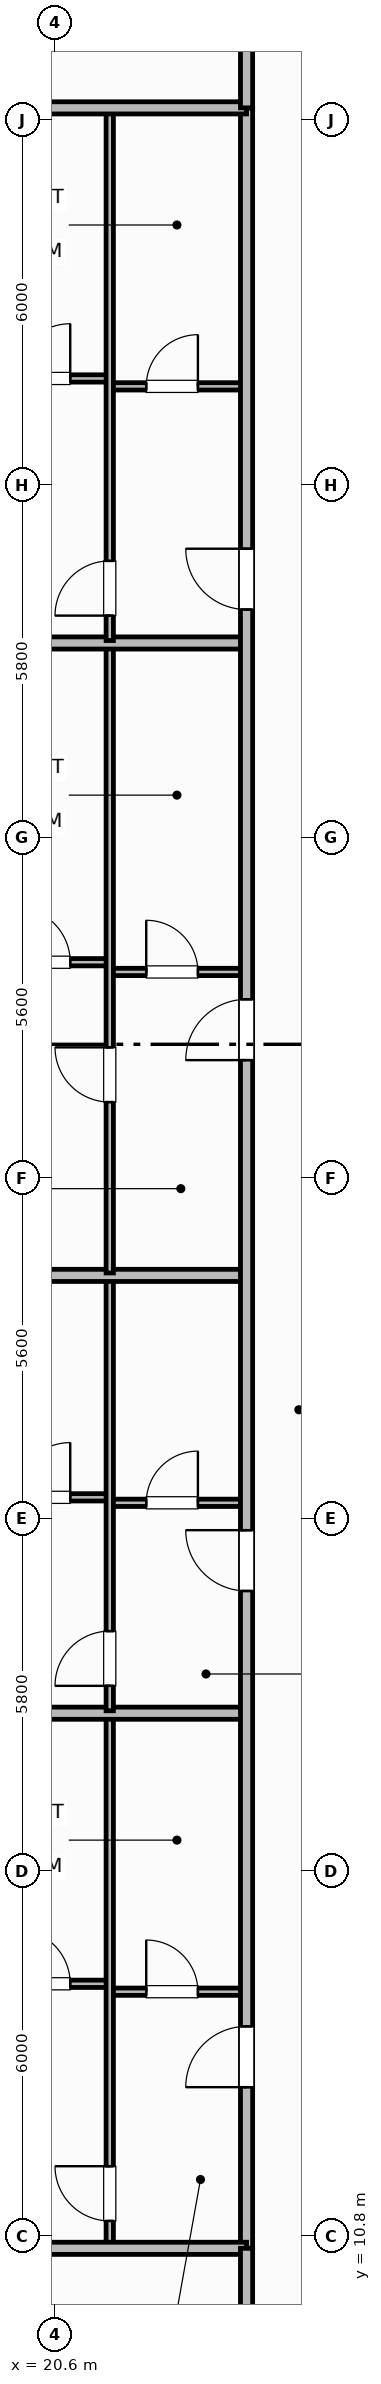
"""IFC4 building model, lengths in metres.
Left out: names, types, materials, properties, quantities, classifications, styles, units other than length and angle.
Written with IfcOpenShell. Run it as: python <this file> out.ifc"""

import sys

from ifc_helpers import new_model, si_unit, direction, frame, frame_2d, origin, place, context, subcontext, project, spatial, rectangle, extrude, element, fill, save


model = new_model("IFC4")
c1 = context("Model", 3, precision=1e-05, world=origin(), true_north=direction((0.0, 1.0)))
c2 = subcontext(c1, "Body", "Model", "MODEL_VIEW")
j1 = project(units=[si_unit("LENGTHUNIT", "METRE"), si_unit("PLANEANGLEUNIT", "RADIAN")], contexts=[c1])
p1 = place(None, origin())
s1 = spatial("IfcSite", under=j1, at=p1, CompositionType="ELEMENT")
p2 = place(p1, origin())
s2 = spatial("IfcBuilding", under=s1, at=p2, CompositionType="ELEMENT")
p3 = place(p2, frame((0.0, 0.0, 54.7)))
s3 = spatial("IfcBuildingStorey", under=s2, at=p3, CompositionType="ELEMENT", Elevation=54.7)
p4 = place(p3, frame((21.5, 14.82, 0.0), z_axis=(0.0, 0.0, 1.0), x_axis=(1.0, 0.0, 0.0)))
e1 = element("IfcWall", 1, at=p4, inside=s3, PredefinedType="PARTITIONING", context=c2, shape_type="SweptSolid", body=[
    extrude(rectangle(XDim=2.25, YDim=0.12, at=frame_2d((1.125, 0.0))), origin(), (0.0, 0.0, 1.0), 2.53),
])
p5 = place(p4, frame((0.6, 0.0, 0.0)))
e2 = element("IfcOpeningElement", 2, at=p5, cuts=e1, PredefinedType="OPENING", context=c2, shape_type="SweptSolid", body=[
    extrude(rectangle(XDim=0.85, YDim=2.1, at=frame_2d((0.425, 1.05))), frame((0.0, 0.07, 0.0), z_axis=(0.0, -1.0, 0.0), x_axis=(1.0, 0.0, 0.0)), (0.0, 0.0, 1.0), 0.14),
])
p6 = place(p3, frame((14.57, 14.95, 0.0), z_axis=(0.0, 0.0, 1.0), x_axis=(1.0, 0.0, 0.0)))
e3 = element("IfcWall", 3, at=p6, inside=s3, PredefinedType="PARTITIONING", context=c2, shape_type="SweptSolid", body=[
    extrude(rectangle(XDim=6.93, YDim=0.12, at=frame_2d((3.465, 0.0))), origin(), (0.0, 0.0, 1.0), 2.53),
])
p7 = place(p6, frame((5.38, 0.0, 0.0)))
e4 = element("IfcOpeningElement", 4, at=p7, cuts=e3, PredefinedType="OPENING", context=c2, shape_type="SweptSolid", body=[
    extrude(rectangle(XDim=0.9, YDim=2.1, at=frame_2d((0.45, 1.05))), frame((0.0, 0.07, 0.0), z_axis=(0.0, -1.0, 0.0), x_axis=(1.0, 0.0, 0.0)), (0.0, 0.0, 1.0), 0.14),
])
p8 = place(p3, frame((21.5, 10.64, 0.0), z_axis=(0.0, 0.0, 1.0), x_axis=(0.0, 1.0, 0.0)))
e5 = element("IfcWall", 5, at=p8, inside=s3, PredefinedType="PARTITIONING", context=c2, shape_type="SweptSolid", body=[
    extrude(rectangle(XDim=8.72, YDim=0.12, at=frame_2d((4.36, 0.0))), origin(), (0.0, 0.0, 1.0), 2.53),
])
p9 = place(p8, frame((0.41, 0.0, 0.0)))
e6 = element("IfcOpeningElement", 6, at=p9, cuts=e5, PredefinedType="OPENING", context=c2, shape_type="SweptSolid", body=[
    extrude(rectangle(XDim=0.9, YDim=2.1, at=frame_2d((0.45, 1.05))), frame((0.0, 0.07, 0.0), z_axis=(0.0, -1.0, 0.0), x_axis=(1.0, 0.0, 0.0)), (0.0, 0.0, 1.0), 0.14),
])
p10 = place(p3, frame((14.57, 19.4, 0.0), z_axis=(0.0, 0.0, 1.0), x_axis=(1.0, 0.0, 0.0)))
e7 = element("IfcWall", 7, at=p10, inside=s3, PredefinedType="PARTITIONING", context=c2, shape_type="SweptSolid", body=[
    extrude(rectangle(XDim=9.18, YDim=0.2, at=frame_2d((4.59, 0.0))), origin(), (0.0, 0.0, 1.0), 2.53),
])
p11 = place(p3, frame((21.5, 22.86, 0.0), z_axis=(0.0, 0.0, 1.0), x_axis=(1.0, 0.0, 0.0)))
e8 = element("IfcWall", 8, at=p11, inside=s3, PredefinedType="PARTITIONING", context=c2, shape_type="SweptSolid", body=[
    extrude(rectangle(XDim=2.25, YDim=0.12, at=frame_2d((1.125, 0.0))), origin(), (0.0, 0.0, 1.0), 2.53),
])
p12 = place(p11, frame((0.6, 0.0, 0.0)))
e9 = element("IfcOpeningElement", 9, at=p12, cuts=e8, PredefinedType="OPENING", context=c2, shape_type="SweptSolid", body=[
    extrude(rectangle(XDim=0.85, YDim=2.1, at=frame_2d((0.425, 1.05))), frame((0.0, 0.07, 0.0), z_axis=(0.0, -1.0, 0.0), x_axis=(1.0, 0.0, 0.0)), (0.0, 0.0, 1.0), 0.14),
])
p13 = place(p3, frame((14.57, 22.95, 0.0), z_axis=(0.0, 0.0, 1.0), x_axis=(1.0, 0.0, 0.0)))
e10 = element("IfcWall", 10, at=p13, inside=s3, PredefinedType="PARTITIONING", context=c2, shape_type="SweptSolid", body=[
    extrude(rectangle(XDim=6.93, YDim=0.12, at=frame_2d((3.465, 0.0))), origin(), (0.0, 0.0, 1.0), 2.53),
])
p14 = place(p13, frame((5.38, 0.0, 0.0)))
e11 = element("IfcOpeningElement", 11, at=p14, cuts=e10, PredefinedType="OPENING", context=c2, shape_type="SweptSolid", body=[
    extrude(rectangle(XDim=0.9, YDim=2.1, at=frame_2d((0.45, 1.05))), frame((0.0, 0.07, 0.0), z_axis=(0.0, -1.0, 0.0), x_axis=(1.0, 0.0, 0.0)), (0.0, 0.0, 1.0), 0.14),
])
p15 = place(p3, frame((21.5, 19.44, 0.0), z_axis=(0.0, 0.0, 1.0), x_axis=(0.0, 1.0, 0.0)))
e12 = element("IfcWall", 12, at=p15, inside=s3, PredefinedType="PARTITIONING", context=c2, shape_type="SweptSolid", body=[
    extrude(rectangle(XDim=7.12, YDim=0.12, at=frame_2d((3.56, 0.0))), origin(), (0.0, 0.0, 1.0), 2.53),
])
p16 = place(p15, frame((0.41, 0.0, 0.0)))
e13 = element("IfcOpeningElement", 13, at=p16, cuts=e12, PredefinedType="OPENING", context=c2, shape_type="SweptSolid", body=[
    extrude(rectangle(XDim=0.9, YDim=2.1, at=frame_2d((0.45, 1.05))), frame((0.0, 0.07, 0.0), z_axis=(0.0, -1.0, 0.0), x_axis=(1.0, 0.0, 0.0)), (0.0, 0.0, 1.0), 0.14),
])
p17 = place(p3, frame((15.284, 26.6, 0.0), z_axis=(0.0, 0.0, 1.0), x_axis=(1.0, 0.0, 0.0)))
e14 = element("IfcWall", 14, at=p17, inside=s3, PredefinedType="PARTITIONING", context=c2, shape_type="SweptSolid", body=[
    extrude(rectangle(XDim=8.466, YDim=0.2, at=frame_2d((4.233, 0.0))), origin(), (0.0, 0.0, 1.0), 2.53),
])
p18 = place(p3, frame((21.5, 31.59, 0.0), z_axis=(0.0, 0.0, 1.0), x_axis=(1.0, 0.0, 0.0)))
e15 = element("IfcWall", 15, at=p18, inside=s3, PredefinedType="PARTITIONING", context=c2, shape_type="SweptSolid", body=[
    extrude(rectangle(XDim=2.25, YDim=0.12, at=frame_2d((1.125, 0.0))), origin(), (0.0, 0.0, 1.0), 2.53),
])
p19 = place(p18, frame((0.6, 0.0, 0.0)))
e16 = element("IfcOpeningElement", 16, at=p19, cuts=e15, PredefinedType="OPENING", context=c2, shape_type="SweptSolid", body=[
    extrude(rectangle(XDim=0.85, YDim=2.1, at=frame_2d((0.425, 1.05))), frame((0.0, 0.07, 0.0), z_axis=(0.0, -1.0, 0.0), x_axis=(1.0, 0.0, 0.0)), (0.0, 0.0, 1.0), 0.14),
])
p20 = place(p3, frame((15.053, 31.75, 0.0), z_axis=(0.0, 0.0, 1.0), x_axis=(1.0, 0.0, 0.0)))
e17 = element("IfcWall", 17, at=p20, inside=s3, PredefinedType="PARTITIONING", context=c2, shape_type="SweptSolid", body=[
    extrude(rectangle(XDim=6.447, YDim=0.12, at=frame_2d((3.224, 0.0))), origin(), (0.0, 0.0, 1.0), 2.53),
])
p21 = place(p20, frame((4.897, 0.0, 0.0)))
e18 = element("IfcOpeningElement", 18, at=p21, cuts=e17, PredefinedType="OPENING", context=c2, shape_type="SweptSolid", body=[
    extrude(rectangle(XDim=0.9, YDim=2.1, at=frame_2d((0.45, 1.05))), frame((0.0, 0.07, 0.0), z_axis=(0.0, -1.0, 0.0), x_axis=(1.0, 0.0, 0.0)), (0.0, 0.0, 1.0), 0.14),
])
p22 = place(p3, frame((21.5, 26.64, 0.0), z_axis=(0.0, 0.0, 1.0), x_axis=(0.0, 1.0, 0.0)))
e19 = element("IfcWall", 19, at=p22, inside=s3, PredefinedType="PARTITIONING", context=c2, shape_type="SweptSolid", body=[
    extrude(rectangle(XDim=10.32, YDim=0.12, at=frame_2d((5.16, 0.0))), origin(), (0.0, 0.0, 1.0), 2.53),
])
p23 = place(p22, frame((2.81, 0.0, 0.0)))
e20 = element("IfcOpeningElement", 20, at=p23, cuts=e19, PredefinedType="OPENING", context=c2, shape_type="SweptSolid", body=[
    extrude(rectangle(XDim=0.9, YDim=2.1, at=frame_2d((0.45, 1.05))), frame((0.0, 0.07, 0.0), z_axis=(0.0, -1.0, 0.0), x_axis=(1.0, 0.0, 0.0)), (0.0, 0.0, 1.0), 0.14),
])
p24 = place(p3, frame((14.57, 37.0, 0.0), z_axis=(0.0, 0.0, 1.0), x_axis=(1.0, 0.0, 0.0)))
e21 = element("IfcWall", 21, at=p24, inside=s3, PredefinedType="PARTITIONING", context=c2, shape_type="SweptSolid", body=[
    extrude(rectangle(XDim=9.18, YDim=0.2, at=frame_2d((4.59, 0.0))), origin(), (0.0, 0.0, 1.0), 2.53),
])
p25 = place(p3, frame((21.5, 41.22, 0.0), z_axis=(0.0, 0.0, 1.0), x_axis=(1.0, 0.0, 0.0)))
e22 = element("IfcWall", 22, at=p25, inside=s3, PredefinedType="PARTITIONING", context=c2, shape_type="SweptSolid", body=[
    extrude(rectangle(XDim=2.25, YDim=0.12, at=frame_2d((1.125, 0.0))), origin(), (0.0, 0.0, 1.0), 2.53),
])
p26 = place(p25, frame((0.6, 0.0, 0.0)))
e23 = element("IfcOpeningElement", 23, at=p26, cuts=e22, PredefinedType="OPENING", context=c2, shape_type="SweptSolid", body=[
    extrude(rectangle(XDim=0.85, YDim=2.1, at=frame_2d((0.425, 1.05))), frame((0.0, 0.07, 0.0), z_axis=(0.0, -1.0, 0.0), x_axis=(1.0, 0.0, 0.0)), (0.0, 0.0, 1.0), 0.14),
])
p27 = place(p3, frame((14.57, 41.35, 0.0), z_axis=(0.0, 0.0, 1.0), x_axis=(1.0, 0.0, 0.0)))
e24 = element("IfcWall", 24, at=p27, inside=s3, PredefinedType="PARTITIONING", context=c2, shape_type="SweptSolid", body=[
    extrude(rectangle(XDim=6.93, YDim=0.12, at=frame_2d((3.465, 0.0))), origin(), (0.0, 0.0, 1.0), 2.53),
])
p28 = place(p27, frame((5.38, 0.0, 0.0)))
e25 = element("IfcOpeningElement", 25, at=p28, cuts=e24, PredefinedType="OPENING", context=c2, shape_type="SweptSolid", body=[
    extrude(rectangle(XDim=0.9, YDim=2.1, at=frame_2d((0.45, 1.05))), frame((0.0, 0.07, 0.0), z_axis=(0.0, -1.0, 0.0), x_axis=(1.0, 0.0, 0.0)), (0.0, 0.0, 1.0), 0.14),
])
p29 = place(p3, frame((21.5, 37.04, 0.0), z_axis=(0.0, 0.0, 1.0), x_axis=(0.0, 1.0, 0.0)))
e26 = element("IfcWall", 26, at=p29, inside=s3, PredefinedType="PARTITIONING", context=c2, shape_type="SweptSolid", body=[
    extrude(rectangle(XDim=8.72, YDim=0.12, at=frame_2d((4.36, 0.0))), origin(), (0.0, 0.0, 1.0), 2.53),
])
p30 = place(p29, frame((0.41, 0.0, 0.0)))
e27 = element("IfcOpeningElement", 27, at=p30, cuts=e26, PredefinedType="OPENING", context=c2, shape_type="SweptSolid", body=[
    extrude(rectangle(XDim=0.9, YDim=2.1, at=frame_2d((0.45, 1.05))), frame((0.0, 0.07, 0.0), z_axis=(0.0, -1.0, 0.0), x_axis=(1.0, 0.0, 0.0)), (0.0, 0.0, 1.0), 0.14),
])
p31 = place(p3, frame((23.75, 10.6, 0.0), z_axis=(0.0, 0.0, 1.0), x_axis=(0.0, 1.0, 0.0)))
e28 = element("IfcWall", 28, at=p31, inside=s3, PredefinedType="PARTITIONING", context=c2, shape_type="SweptSolid", body=[
    extrude(rectangle(XDim=35.2, YDim=0.2, at=frame_2d((17.6, 0.0))), origin(), (0.0, 0.0, 1.0), 2.53),
])
p32 = place(p31, frame((2.65, 0.0, 0.0)))
e29 = element("IfcOpeningElement", 29, at=p32, cuts=e28, PredefinedType="OPENING", context=c2, shape_type="SweptSolid", body=[
    extrude(rectangle(XDim=1.0, YDim=2.15, at=frame_2d((0.5, 1.075))), frame((0.0, 0.11, 0.0), z_axis=(0.0, -1.0, 0.0), x_axis=(1.0, 0.0, 0.0)), (0.0, 0.0, 1.0), 0.22),
])
p33 = place(p31, frame((10.81, 0.0, 0.0)))
e30 = element("IfcOpeningElement", 30, at=p33, cuts=e28, PredefinedType="OPENING", context=c2, shape_type="SweptSolid", body=[
    extrude(rectangle(XDim=1.0, YDim=2.15, at=frame_2d((0.5, 1.075))), frame((0.0, 0.11, 0.0), z_axis=(0.0, -1.0, 0.0), x_axis=(1.0, 0.0, 0.0)), (0.0, 0.0, 1.0), 0.22),
])
p34 = place(p31, frame((19.54, 0.0, 0.0)))
e31 = element("IfcOpeningElement", 31, at=p34, cuts=e28, PredefinedType="OPENING", context=c2, shape_type="SweptSolid", body=[
    extrude(rectangle(XDim=1.0, YDim=2.15, at=frame_2d((0.5, 1.075))), frame((0.0, 0.11, 0.0), z_axis=(0.0, -1.0, 0.0), x_axis=(1.0, 0.0, 0.0)), (0.0, 0.0, 1.0), 0.22),
])
p35 = place(p31, frame((26.95, 0.0, 0.0)))
e32 = element("IfcOpeningElement", 32, at=p35, cuts=e28, PredefinedType="OPENING", context=c2, shape_type="SweptSolid", body=[
    extrude(rectangle(XDim=1.0, YDim=2.15, at=frame_2d((0.5, 1.075))), frame((0.0, 0.11, 0.0), z_axis=(0.0, -1.0, 0.0), x_axis=(1.0, 0.0, 0.0)), (0.0, 0.0, 1.0), 0.22),
])
for number, where, z_axis, x_axis in (
    (33, (14.99, 10.6, 0.0), (0.0, 0.0, 1.0), (1.0, 0.0, 0.0)),
    (34, (14.99, 45.8, 0.0), (0.0, 0.0, 1.0), (1.0, 0.0, 0.0)),
):
    element("IfcWall", number, at=place(p3, frame(where, z_axis=z_axis, x_axis=x_axis)), inside=s3, PredefinedType="PARTITIONING", context=c2, shape_type="SweptSolid", body=[
        extrude(rectangle(XDim=8.76, YDim=0.2, at=frame_2d((4.38, 0.0))), origin(), (0.0, 0.0, 1.0), 2.53),
    ])
p36 = place(p3, frame((23.75, 4.97, 0.0), z_axis=(0.0, 0.0, 1.0), x_axis=(0.0, 1.0, 0.0)))
e35 = element("IfcWall", 35, at=p36, inside=s3, PredefinedType="PARTITIONING", context=c2, shape_type="SweptSolid", body=[
    extrude(rectangle(XDim=5.63, YDim=0.2, at=frame_2d((2.815, 0.0))), origin(), (0.0, 0.0, 1.0), 2.53),
])
p37 = place(p3, frame((23.75, 45.8, 0.0), z_axis=(0.0, 0.0, 1.0), x_axis=(0.0, 1.0, 0.0)))
e36 = element("IfcWall", 36, at=p37, inside=s3, PredefinedType="PARTITIONING", context=c2, shape_type="SweptSolid", body=[
    extrude(rectangle(XDim=5.63, YDim=0.2, at=frame_2d((2.815, 0.0))), origin(), (0.0, 0.0, 1.0), 2.53),
])
p38 = place(p5, origin())
e37 = element("IfcDoor", 37, at=p38, inside=s3, OperationType="SINGLE_SWING_LEFT", PredefinedType="DOOR", context=c2, shape_type="SweptSolid", body=[
    extrude(rectangle(XDim=0.85, YDim=2.1, at=frame_2d((0.425, 1.05))), frame((0.0, 0.025, 0.0), z_axis=(0.0, -1.0, 0.0), x_axis=(1.0, 0.0, 0.0)), (0.0, 0.0, 1.0), 0.05),
])
fill(e2, e37)
p39 = place(p7, origin())
e38 = element("IfcDoor", 38, at=p39, inside=s3, OperationType="SINGLE_SWING_LEFT", PredefinedType="DOOR", context=c2, shape_type="SweptSolid", body=[
    extrude(rectangle(XDim=0.9, YDim=2.1, at=frame_2d((0.45, 1.05))), frame((0.0, 0.025, 0.0), z_axis=(0.0, -1.0, 0.0), x_axis=(1.0, 0.0, 0.0)), (0.0, 0.0, 1.0), 0.05),
])
fill(e4, e38)
p40 = place(p9, origin())
e39 = element("IfcDoor", 39, at=p40, inside=s3, OperationType="SINGLE_SWING_RIGHT", PredefinedType="DOOR", context=c2, shape_type="SweptSolid", body=[
    extrude(rectangle(XDim=0.9, YDim=2.1, at=frame_2d((0.45, 1.05))), frame((0.0, 0.025, 0.0), z_axis=(0.0, -1.0, 0.0), x_axis=(1.0, 0.0, 0.0)), (0.0, 0.0, 1.0), 0.05),
])
fill(e6, e39)
p41 = place(p12, origin())
e40 = element("IfcDoor", 40, at=p41, inside=s3, OperationType="SINGLE_SWING_RIGHT", PredefinedType="DOOR", context=c2, shape_type="SweptSolid", body=[
    extrude(rectangle(XDim=0.85, YDim=2.1, at=frame_2d((0.425, 1.05))), frame((0.0, 0.025, 0.0), z_axis=(0.0, -1.0, 0.0), x_axis=(1.0, 0.0, 0.0)), (0.0, 0.0, 1.0), 0.05),
])
fill(e9, e40)
p42 = place(p14, origin())
e41 = element("IfcDoor", 41, at=p42, inside=s3, OperationType="SINGLE_SWING_RIGHT", PredefinedType="DOOR", context=c2, shape_type="SweptSolid", body=[
    extrude(rectangle(XDim=0.9, YDim=2.1, at=frame_2d((0.45, 1.05))), frame((0.0, 0.025, 0.0), z_axis=(0.0, -1.0, 0.0), x_axis=(1.0, 0.0, 0.0)), (0.0, 0.0, 1.0), 0.05),
])
fill(e11, e41)
p43 = place(p16, origin())
e42 = element("IfcDoor", 42, at=p43, inside=s3, OperationType="SINGLE_SWING_LEFT", PredefinedType="DOOR", context=c2, shape_type="SweptSolid", body=[
    extrude(rectangle(XDim=0.9, YDim=2.1, at=frame_2d((0.45, 1.05))), frame((0.0, 0.025, 0.0), z_axis=(0.0, -1.0, 0.0), x_axis=(1.0, 0.0, 0.0)), (0.0, 0.0, 1.0), 0.05),
])
fill(e13, e42)
p44 = place(p19, origin())
e43 = element("IfcDoor", 43, at=p44, inside=s3, OperationType="SINGLE_SWING_LEFT", PredefinedType="DOOR", context=c2, shape_type="SweptSolid", body=[
    extrude(rectangle(XDim=0.85, YDim=2.1, at=frame_2d((0.425, 1.05))), frame((0.0, 0.025, 0.0), z_axis=(0.0, -1.0, 0.0), x_axis=(1.0, 0.0, 0.0)), (0.0, 0.0, 1.0), 0.05),
])
fill(e16, e43)
p45 = place(p21, origin())
e44 = element("IfcDoor", 44, at=p45, inside=s3, OperationType="SINGLE_SWING_LEFT", PredefinedType="DOOR", context=c2, shape_type="SweptSolid", body=[
    extrude(rectangle(XDim=0.9, YDim=2.1, at=frame_2d((0.45, 1.05))), frame((0.0, 0.025, 0.0), z_axis=(0.0, -1.0, 0.0), x_axis=(1.0, 0.0, 0.0)), (0.0, 0.0, 1.0), 0.05),
])
fill(e18, e44)
p46 = place(p23, origin())
e45 = element("IfcDoor", 45, at=p46, inside=s3, OperationType="SINGLE_SWING_RIGHT", PredefinedType="DOOR", context=c2, shape_type="SweptSolid", body=[
    extrude(rectangle(XDim=0.9, YDim=2.1, at=frame_2d((0.45, 1.05))), frame((0.0, 0.025, 0.0), z_axis=(0.0, -1.0, 0.0), x_axis=(1.0, 0.0, 0.0)), (0.0, 0.0, 1.0), 0.05),
])
fill(e20, e45)
p47 = place(p26, origin())
e46 = element("IfcDoor", 46, at=p47, inside=s3, OperationType="SINGLE_SWING_RIGHT", PredefinedType="DOOR", context=c2, shape_type="SweptSolid", body=[
    extrude(rectangle(XDim=0.85, YDim=2.1, at=frame_2d((0.425, 1.05))), frame((0.0, 0.025, 0.0), z_axis=(0.0, -1.0, 0.0), x_axis=(1.0, 0.0, 0.0)), (0.0, 0.0, 1.0), 0.05),
])
fill(e23, e46)
p48 = place(p28, origin())
e47 = element("IfcDoor", 47, at=p48, inside=s3, OperationType="SINGLE_SWING_RIGHT", PredefinedType="DOOR", context=c2, shape_type="SweptSolid", body=[
    extrude(rectangle(XDim=0.9, YDim=2.1, at=frame_2d((0.45, 1.05))), frame((0.0, 0.025, 0.0), z_axis=(0.0, -1.0, 0.0), x_axis=(1.0, 0.0, 0.0)), (0.0, 0.0, 1.0), 0.05),
])
fill(e25, e47)
p49 = place(p30, origin())
e48 = element("IfcDoor", 48, at=p49, inside=s3, OperationType="SINGLE_SWING_LEFT", PredefinedType="DOOR", context=c2, shape_type="SweptSolid", body=[
    extrude(rectangle(XDim=0.9, YDim=2.1, at=frame_2d((0.45, 1.05))), frame((0.0, 0.025, 0.0), z_axis=(0.0, -1.0, 0.0), x_axis=(1.0, 0.0, 0.0)), (0.0, 0.0, 1.0), 0.05),
])
fill(e27, e48)
p50 = place(p32, origin())
e49 = element("IfcDoor", 49, at=p50, inside=s3, OperationType="SINGLE_SWING_LEFT", PredefinedType="DOOR", context=c2, shape_type="SweptSolid", body=[
    extrude(rectangle(XDim=1.0, YDim=2.15, at=frame_2d((0.5, 1.075))), frame((0.0, 0.025, 0.0), z_axis=(0.0, -1.0, 0.0), x_axis=(1.0, 0.0, 0.0)), (0.0, 0.0, 1.0), 0.05),
])
fill(e29, e49)
p51 = place(p33, origin())
e50 = element("IfcDoor", 50, at=p51, inside=s3, OperationType="SINGLE_SWING_RIGHT", PredefinedType="DOOR", context=c2, shape_type="SweptSolid", body=[
    extrude(rectangle(XDim=1.0, YDim=2.15, at=frame_2d((0.5, 1.075))), frame((0.0, 0.025, 0.0), z_axis=(0.0, -1.0, 0.0), x_axis=(1.0, 0.0, 0.0)), (0.0, 0.0, 1.0), 0.05),
])
fill(e30, e50)
p52 = place(p34, origin())
e51 = element("IfcDoor", 51, at=p52, inside=s3, OperationType="SINGLE_SWING_LEFT", PredefinedType="DOOR", context=c2, shape_type="SweptSolid", body=[
    extrude(rectangle(XDim=1.0, YDim=2.15, at=frame_2d((0.5, 1.075))), frame((0.0, 0.025, 0.0), z_axis=(0.0, -1.0, 0.0), x_axis=(1.0, 0.0, 0.0)), (0.0, 0.0, 1.0), 0.05),
])
fill(e31, e51)
p53 = place(p35, origin())
e52 = element("IfcDoor", 52, at=p53, inside=s3, OperationType="SINGLE_SWING_RIGHT", PredefinedType="DOOR", context=c2, shape_type="SweptSolid", body=[
    extrude(rectangle(XDim=1.0, YDim=2.15, at=frame_2d((0.5, 1.075))), frame((0.0, 0.025, 0.0), z_axis=(0.0, -1.0, 0.0), x_axis=(1.0, 0.0, 0.0)), (0.0, 0.0, 1.0), 0.05),
])
fill(e32, e52)
save(model, sys.argv[1])
